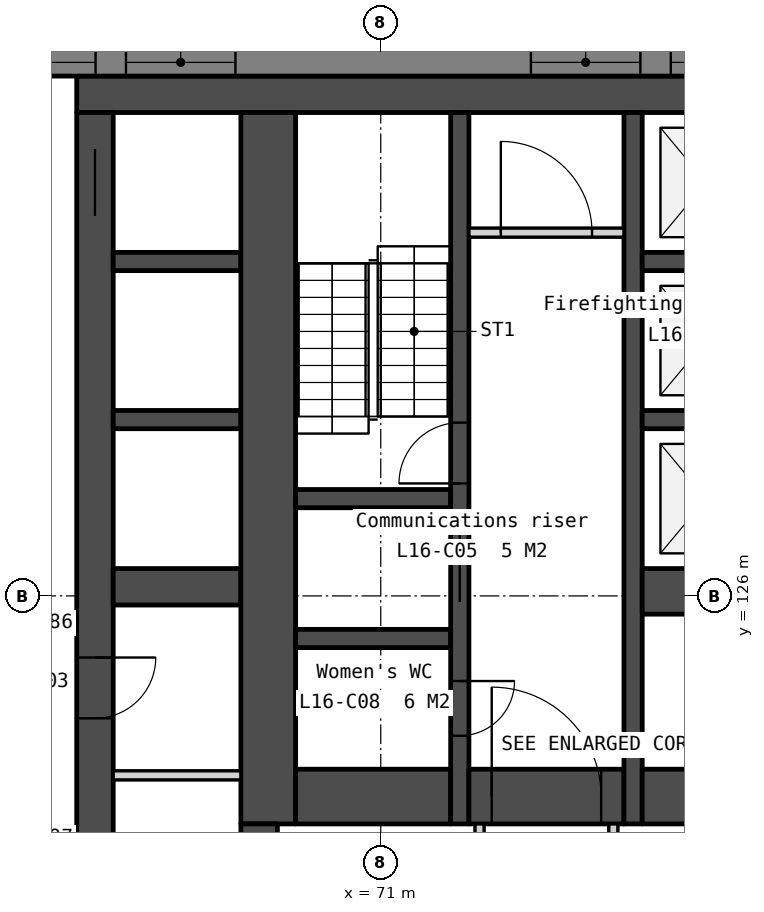
"""IFC4 building model, lengths in metres.
Left out: names, types, materials, properties, quantities, classifications, styles, units other than length and angle.
Written with IfcOpenShell. Run it as: python <this file> out.ifc"""

import sys

from ifc_helpers import new_model, si_unit, direction, frame, frame_2d, origin, place, context, subcontext, project, spatial, polyline, rectangle, outline, extrude, element, fill, save


model = new_model("IFC4")
c1 = context("Model", 3, precision=1e-05, world=origin(), true_north=direction((0.0, 1.0)))
c2 = subcontext(c1, "Body", "Model", "MODEL_VIEW")
j1 = project(units=[si_unit("LENGTHUNIT", "METRE"), si_unit("PLANEANGLEUNIT", "RADIAN")], contexts=[c1])
p1 = place(None, origin())
s1 = spatial("IfcSite", under=j1, at=p1, CompositionType="ELEMENT")
p2 = place(p1, origin())
s2 = spatial("IfcBuilding", under=s1, at=p2, CompositionType="ELEMENT")
p3 = place(p2, frame((0.0, 0.0, 70.0)))
s3 = spatial("IfcBuildingStorey", under=s2, at=p3, CompositionType="ELEMENT", Elevation=70.0)
p4 = place(p3, frame((66.0, 134.25, 0.0), z_axis=(0.0, 0.0, 1.0), x_axis=(1.0, 0.0, 0.0)))
e1 = element("IfcWall", 1, at=p4, inside=s3, PredefinedType="SOLIDWALL", context=c2, shape_type="SweptSolid", body=[
    extrude(rectangle(XDim=28.0, YDim=0.6, at=frame_2d((14.0, 0.0))), origin(), (0.0, 0.0, 1.0), 3.35),
])
p5 = place(p3, frame((66.3, 133.95, 0.0), z_axis=(0.0, 0.0, 1.0), x_axis=(0.0, -1.0, 0.0)))
e2 = element("IfcWall", 2, at=p5, inside=s3, PredefinedType="SOLIDWALL", context=c2, shape_type="SweptSolid", body=[
    extrude(rectangle(XDim=13.8, YDim=0.6, at=frame_2d((6.9, 0.0))), origin(), (0.0, 0.0, 1.0), 3.35),
])
p6 = place(p5, frame((0.6, 0.0, 0.0)))
e3 = element("IfcOpeningElement", 3, at=p6, cuts=e2, PredefinedType="OPENING", context=c2, shape_type="SweptSolid", body=[
    extrude(rectangle(XDim=1.1, YDim=2.1, at=frame_2d((0.55, 1.05))), frame((0.0, 0.31, 0.0), z_axis=(0.0, -1.0, 0.0), x_axis=(1.0, 0.0, 0.0)), (0.0, 0.0, 1.0), 0.62),
])
p7 = place(p5, frame((8.963, 0.0, 0.0)))
e4 = element("IfcOpeningElement", 4, at=p7, cuts=e2, PredefinedType="OPENING", context=c2, shape_type="SweptSolid", body=[
    extrude(rectangle(XDim=1.0, YDim=2.1, at=frame_2d((0.5, 1.05))), frame((0.0, 0.31, 0.0), z_axis=(0.0, -1.0, 0.0), x_axis=(1.0, 0.0, 0.0)), (0.0, 0.0, 1.0), 0.62),
])
p8 = place(p5, frame((11.888, 0.0, 0.0)))
e5 = element("IfcOpeningElement", 5, at=p8, cuts=e2, PredefinedType="OPENING", context=c2, shape_type="SweptSolid", body=[
    extrude(rectangle(XDim=1.0, YDim=2.1, at=frame_2d((0.5, 1.05))), frame((0.0, 0.31, 0.0), z_axis=(0.0, -1.0, 0.0), x_axis=(1.0, 0.0, 0.0)), (0.0, 0.0, 1.0), 0.62),
])
for number, where, z_axis, x_axis in (
    (6, (66.6, 131.5, 0.0), (0.0, 0.0, 1.0), (1.0, 0.0, 0.0)),
    (7, (66.6, 128.9, 0.0), (0.0, 0.0, 1.0), (1.0, 0.0, 0.0)),
):
    element("IfcWall", number, at=place(p3, frame(where, z_axis=z_axis, x_axis=x_axis)), inside=s3, PredefinedType="SOLIDWALL", context=c2, shape_type="SweptSolid", body=[
        extrude(rectangle(XDim=2.1, YDim=0.3, at=frame_2d((1.05, 0.0))), origin(), (0.0, 0.0, 1.0), 3.35),
    ])
p9 = place(p3, frame((66.6, 126.15, 0.0), z_axis=(0.0, 0.0, 1.0), x_axis=(1.0, 0.0, 0.0)))
e8 = element("IfcWall", 8, at=p9, inside=s3, PredefinedType="SOLIDWALL", context=c2, shape_type="SweptSolid", body=[
    extrude(rectangle(XDim=2.1, YDim=0.6, at=frame_2d((1.05, 0.0))), origin(), (0.0, 0.0, 1.0), 3.35),
])
p10 = place(p3, frame((66.6, 123.049, 0.0), z_axis=(0.0, 0.0, 1.0), x_axis=(1.0, 0.0, 0.0)))
e9 = element("IfcWall", 9, at=p10, inside=s3, PredefinedType="PARTITIONING", context=c2, shape_type="SweptSolid", body=[
    extrude(rectangle(XDim=2.1, YDim=0.15, at=frame_2d((1.05, 0.0))), origin(), (0.0, 0.0, 1.0), 3.35),
])
p11 = place(p3, frame((69.15, 133.95, 0.0), z_axis=(0.0, 0.0, 1.0), x_axis=(0.0, -1.0, 0.0)))
e10 = element("IfcWall", 10, at=p11, inside=s3, PredefinedType="SOLIDWALL", context=c2, shape_type="SweptSolid", body=[
    extrude(rectangle(XDim=11.7, YDim=0.9, at=frame_2d((5.85, 0.0))), origin(), (0.0, 0.0, 1.0), 3.35),
])
p12 = place(p3, frame((69.0, 122.25, 0.0), z_axis=(0.0, 0.0, 1.0), x_axis=(0.0, -1.0, 0.0)))
e11 = element("IfcWall", 11, at=p12, inside=s3, PredefinedType="SOLIDWALL", context=c2, shape_type="SweptSolid", body=[
    extrude(rectangle(XDim=2.1, YDim=0.6, at=frame_2d((1.05, 0.0))), origin(), (0.0, 0.0, 1.0), 3.35),
])
for number, where, z_axis, x_axis in (
    (12, (69.6, 127.6, 0.0), (0.0, 0.0, 1.0), (1.0, 0.0, 0.0)),
    (13, (69.6, 125.3, 0.0), (0.0, 0.0, 1.0), (1.0, 0.0, 0.0)),
):
    element("IfcWall", number, at=place(p3, frame(where, z_axis=z_axis, x_axis=x_axis)), inside=s3, PredefinedType="SOLIDWALL", context=c2, shape_type="SweptSolid", body=[
        extrude(rectangle(XDim=2.55, YDim=0.3, at=frame_2d((1.275, 0.0))), origin(), (0.0, 0.0, 1.0), 3.35),
    ])
p13 = place(p3, frame((69.6, 122.7, 0.0), z_axis=(0.0, 0.0, 1.0), x_axis=(1.0, 0.0, 0.0)))
e14 = element("IfcWall", 14, at=p13, inside=s3, PredefinedType="SOLIDWALL", context=c2, shape_type="SweptSolid", body=[
    extrude(rectangle(XDim=2.55, YDim=0.9, at=frame_2d((1.275, 0.0))), origin(), (0.0, 0.0, 1.0), 3.35),
])
p14 = place(p3, frame((72.3, 133.95, 0.0), z_axis=(0.0, 0.0, 1.0), x_axis=(0.0, -1.0, 0.0)))
e15 = element("IfcWall", 15, at=p14, inside=s3, PredefinedType="SOLIDWALL", context=c2, shape_type="SweptSolid", body=[
    extrude(rectangle(XDim=11.7, YDim=0.3, at=frame_2d((5.85, 0.0))), origin(), (0.0, 0.0, 1.0), 3.35),
])
p15 = place(p14, frame((6.95, 0.0, 0.0)))
e16 = element("IfcOpeningElement", 16, at=p15, cuts=e15, PredefinedType="OPENING", context=c2, shape_type="SweptSolid", body=[
    extrude(rectangle(XDim=1.1, YDim=2.1, at=frame_2d((0.55, 1.05))), frame((0.0, 0.16, 0.0), z_axis=(0.0, -1.0, 0.0), x_axis=(1.0, 0.0, 0.0)), (0.0, 0.0, 1.0), 0.32),
])
p16 = place(p14, frame((9.35, 0.0, 0.0)))
e17 = element("IfcOpeningElement", 17, at=p16, cuts=e15, PredefinedType="OPENING", context=c2, shape_type="SweptSolid", body=[
    extrude(rectangle(XDim=0.9, YDim=2.1, at=frame_2d((0.45, 1.05))), frame((0.0, 0.16, 0.0), z_axis=(0.0, -1.0, 0.0), x_axis=(1.0, 0.0, 0.0)), (0.0, 0.0, 1.0), 0.32),
])
p17 = place(p14, frame((5.1, 0.0, 0.0)))
e18 = element("IfcOpeningElement", 18, at=p17, cuts=e15, PredefinedType="OPENING", context=c2, shape_type="SweptSolid", body=[
    extrude(rectangle(XDim=1.0, YDim=2.1, at=frame_2d((0.5, 1.05))), frame((0.0, 0.16, 0.0), z_axis=(0.0, -1.0, 0.0), x_axis=(1.0, 0.0, 0.0)), (0.0, 0.0, 1.0), 0.32),
])
p18 = place(p3, frame((72.45, 131.975, 0.0), z_axis=(0.0, 0.0, 1.0), x_axis=(1.0, 0.0, 0.0)))
e19 = element("IfcWall", 19, at=p18, inside=s3, PredefinedType="PARTITIONING", context=c2, shape_type="SweptSolid", body=[
    extrude(rectangle(XDim=2.55, YDim=0.15, at=frame_2d((1.275, 0.0))), origin(), (0.0, 0.0, 1.0), 3.35),
])
p19 = place(p18, frame((0.525, 0.0, 0.0)))
e20 = element("IfcOpeningElement", 20, at=p19, cuts=e19, PredefinedType="OPENING", context=c2, shape_type="SweptSolid", body=[
    extrude(rectangle(XDim=1.5, YDim=2.1, at=frame_2d((0.75, 1.05))), frame((0.0, 0.085, 0.0), z_axis=(0.0, -1.0, 0.0), x_axis=(1.0, 0.0, 0.0)), (0.0, 0.0, 1.0), 0.17),
])
p20 = place(p3, frame((72.45, 122.7, 0.0), z_axis=(0.0, 0.0, 1.0), x_axis=(1.0, 0.0, 0.0)))
e21 = element("IfcWall", 21, at=p20, inside=s3, PredefinedType="SOLIDWALL", context=c2, shape_type="SweptSolid", body=[
    extrude(rectangle(XDim=2.55, YDim=0.9, at=frame_2d((1.275, 0.0))), origin(), (0.0, 0.0, 1.0), 3.35),
])
p21 = place(p20, frame((0.375, 0.0, 0.0)))
e22 = element("IfcOpeningElement", 22, at=p21, cuts=e21, PredefinedType="OPENING", context=c2, shape_type="SweptSolid", body=[
    extrude(rectangle(XDim=1.8, YDim=2.1, at=frame_2d((0.9, 1.05))), frame((0.0, 0.46, 0.0), z_axis=(0.0, -1.0, 0.0), x_axis=(1.0, 0.0, 0.0)), (0.0, 0.0, 1.0), 0.92),
])
for number, where, z_axis, x_axis in (
    (23, (72.625, 122.25, 0.0), (0.0, 0.0, 1.0), (0.0, -1.0, 0.0)),
    (24, (74.825, 122.25, 0.0), (0.0, 0.0, 1.0), (0.0, -1.0, 0.0)),
):
    element("IfcWall", number, at=place(p3, frame(where, z_axis=z_axis, x_axis=x_axis)), inside=s3, PredefinedType="PARTITIONING", context=c2, shape_type="SweptSolid", body=[
        extrude(rectangle(XDim=2.1, YDim=0.15, at=frame_2d((1.05, 0.0))), origin(), (0.0, 0.0, 1.0), 3.35),
    ])
p22 = place(p3, frame((75.15, 133.95, 0.0), z_axis=(0.0, 0.0, 1.0), x_axis=(0.0, -1.0, 0.0)))
e25 = element("IfcWall", 25, at=p22, inside=s3, PredefinedType="SOLIDWALL", context=c2, shape_type="SweptSolid", body=[
    extrude(rectangle(XDim=11.7, YDim=0.3, at=frame_2d((5.85, 0.0))), origin(), (0.0, 0.0, 1.0), 3.35),
])
for number, where, z_axis, x_axis in (
    (26, (75.3, 131.5, 0.0), (0.0, 0.0, 1.0), (1.0, 0.0, 0.0)),
    (27, (75.3, 128.9, 0.0), (0.0, 0.0, 1.0), (1.0, 0.0, 0.0)),
):
    element("IfcWall", number, at=place(p3, frame(where, z_axis=z_axis, x_axis=x_axis)), inside=s3, PredefinedType="SOLIDWALL", context=c2, shape_type="SweptSolid", body=[
        extrude(rectangle(XDim=2.1, YDim=0.3, at=frame_2d((1.05, 0.0))), origin(), (0.0, 0.0, 1.0), 3.35),
    ])
p23 = place(p3, frame((75.3, 126.075, 0.0), z_axis=(0.0, 0.0, 1.0), x_axis=(1.0, 0.0, 0.0)))
e28 = element("IfcWall", 28, at=p23, inside=s3, PredefinedType="SOLIDWALL", context=c2, shape_type="SweptSolid", body=[
    extrude(rectangle(XDim=2.1, YDim=0.75, at=frame_2d((1.05, 0.0))), origin(), (0.0, 0.0, 1.0), 3.35),
])
p24 = place(p3, frame((75.3, 122.7, 0.0), z_axis=(0.0, 0.0, 1.0), x_axis=(1.0, 0.0, 0.0)))
e29 = element("IfcWall", 29, at=p24, inside=s3, PredefinedType="SOLIDWALL", context=c2, shape_type="SweptSolid", body=[
    extrude(rectangle(XDim=6.2, YDim=0.9, at=frame_2d((3.1, 0.0))), origin(), (0.0, 0.0, 1.0), 3.35),
])
p25 = place(p3, frame((102.4, 134.775, -0.15), z_axis=(0.0, 0.0, 1.0), x_axis=(-1.0, 0.0, 0.0)))
e30 = element("IfcWall", 30, at=p25, inside=s3, PredefinedType="SOLIDWALL", context=c2, shape_type="SweptSolid", body=[
    extrude(outline(polyline([(44.8, 0.0), (44.8, 3.5), (0.0, 3.5), (0.0, 0.0), (44.8, 0.0)])), frame((0.0, 0.225, 0.0), z_axis=(0.0, -1.0, 0.0), x_axis=(1.0, 0.0, 0.0)), (0.0, 0.0, 1.0), 0.45),
])
p26 = place(p25, frame((0.786, 0.0, 1.05)))
e31 = element("IfcOpeningElement", 31, at=p26, cuts=e30, PredefinedType="OPENING", context=c2, shape_type="SweptSolid", body=[
    extrude(rectangle(XDim=1.2, YDim=1.5, at=frame_2d((0.6, 0.75))), frame((0.0, 0.235, 0.0), z_axis=(0.0, -1.0, 0.0), x_axis=(1.0, 0.0, 0.0)), (0.0, 0.0, 1.0), 0.47),
])
p27 = place(p25, frame((6.91, 0.0, 1.05)))
e32 = element("IfcOpeningElement", 32, at=p27, cuts=e30, PredefinedType="OPENING", context=c2, shape_type="SweptSolid", body=[
    extrude(rectangle(XDim=1.8, YDim=1.5, at=frame_2d((0.9, 0.75))), frame((0.0, 0.235, 0.0), z_axis=(0.0, -1.0, 0.0), x_axis=(1.0, 0.0, 0.0)), (0.0, 0.0, 1.0), 0.47),
])
p28 = place(p25, frame((9.21, 0.0, 1.05)))
e33 = element("IfcOpeningElement", 33, at=p28, cuts=e30, PredefinedType="OPENING", context=c2, shape_type="SweptSolid", body=[
    extrude(rectangle(XDim=1.8, YDim=1.5, at=frame_2d((0.9, 0.75))), frame((0.0, 0.235, 0.0), z_axis=(0.0, -1.0, 0.0), x_axis=(1.0, 0.0, 0.0)), (0.0, 0.0, 1.0), 0.47),
])
p29 = place(p25, frame((15.87, 0.0, 1.05)))
e34 = element("IfcOpeningElement", 34, at=p29, cuts=e30, PredefinedType="OPENING", context=c2, shape_type="SweptSolid", body=[
    extrude(rectangle(XDim=1.8, YDim=1.5, at=frame_2d((0.9, 0.75))), frame((0.0, 0.235, 0.0), z_axis=(0.0, -1.0, 0.0), x_axis=(1.0, 0.0, 0.0)), (0.0, 0.0, 1.0), 0.47),
])
p30 = place(p25, frame((18.17, 0.0, 1.05)))
e35 = element("IfcOpeningElement", 35, at=p30, cuts=e30, PredefinedType="OPENING", context=c2, shape_type="SweptSolid", body=[
    extrude(rectangle(XDim=1.8, YDim=1.5, at=frame_2d((0.9, 0.75))), frame((0.0, 0.235, 0.0), z_axis=(0.0, -1.0, 0.0), x_axis=(1.0, 0.0, 0.0)), (0.0, 0.0, 1.0), 0.47),
])
p31 = place(p25, frame((24.83, 0.0, 1.05)))
e36 = element("IfcOpeningElement", 36, at=p31, cuts=e30, PredefinedType="OPENING", context=c2, shape_type="SweptSolid", body=[
    extrude(rectangle(XDim=1.8, YDim=1.5, at=frame_2d((0.9, 0.75))), frame((0.0, 0.235, 0.0), z_axis=(0.0, -1.0, 0.0), x_axis=(1.0, 0.0, 0.0)), (0.0, 0.0, 1.0), 0.47),
])
p32 = place(p25, frame((27.13, 0.0, 1.05)))
e37 = element("IfcOpeningElement", 37, at=p32, cuts=e30, PredefinedType="OPENING", context=c2, shape_type="SweptSolid", body=[
    extrude(rectangle(XDim=1.8, YDim=1.5, at=frame_2d((0.9, 0.75))), frame((0.0, 0.235, 0.0), z_axis=(0.0, -1.0, 0.0), x_axis=(1.0, 0.0, 0.0)), (0.0, 0.0, 1.0), 0.47),
])
p33 = place(p25, frame((33.79, 0.0, 1.05)))
e38 = element("IfcOpeningElement", 38, at=p33, cuts=e30, PredefinedType="OPENING", context=c2, shape_type="SweptSolid", body=[
    extrude(rectangle(XDim=1.8, YDim=1.5, at=frame_2d((0.9, 0.75))), frame((0.0, 0.235, 0.0), z_axis=(0.0, -1.0, 0.0), x_axis=(1.0, 0.0, 0.0)), (0.0, 0.0, 1.0), 0.47),
])
p34 = place(p25, frame((36.09, 0.0, 1.05)))
e39 = element("IfcOpeningElement", 39, at=p34, cuts=e30, PredefinedType="OPENING", context=c2, shape_type="SweptSolid", body=[
    extrude(rectangle(XDim=1.8, YDim=1.5, at=frame_2d((0.9, 0.75))), frame((0.0, 0.235, 0.0), z_axis=(0.0, -1.0, 0.0), x_axis=(1.0, 0.0, 0.0)), (0.0, 0.0, 1.0), 0.47),
])
p35 = place(p25, frame((42.814, 0.0, 1.05)))
e40 = element("IfcOpeningElement", 40, at=p35, cuts=e30, PredefinedType="OPENING", context=c2, shape_type="SweptSolid", body=[
    extrude(rectangle(XDim=1.2, YDim=1.5, at=frame_2d((0.6, 0.75))), frame((0.0, 0.235, 0.0), z_axis=(0.0, -1.0, 0.0), x_axis=(1.0, 0.0, 0.0)), (0.0, 0.0, 1.0), 0.47),
])
p36 = place(p3, frame((54.495, 129.397, -0.15), z_axis=(0.0, 0.0, 1.0), x_axis=(0.499999201451, -0.866025864826, 0.0)))
e41 = element("IfcWall", 41, at=p36, inside=s3, PredefinedType="SOLIDWALL", context=c2, shape_type="SweptSolid", body=[
    extrude(outline(polyline([(44.8, 0.0), (44.8, 3.5), (0.0, 3.5), (0.0, 0.0), (44.8, 0.0)])), frame((0.0, 0.225, 0.0), z_axis=(0.0, -1.0, 0.0), x_axis=(1.0, 0.0, 0.0)), (0.0, 0.0, 1.0), 0.45),
])
p37 = place(p36, frame((0.786, 0.0, 1.05)))
e42 = element("IfcOpeningElement", 42, at=p37, cuts=e41, PredefinedType="OPENING", context=c2, shape_type="SweptSolid", body=[
    extrude(rectangle(XDim=1.2, YDim=1.5, at=frame_2d((0.6, 0.75))), frame((0.0, 0.235, 0.0), z_axis=(0.0, -1.0, 0.0), x_axis=(1.0, 0.0, 0.0)), (0.0, 0.0, 1.0), 0.47),
])
p38 = place(p36, frame((6.91, 0.0, 1.05)))
e43 = element("IfcOpeningElement", 43, at=p38, cuts=e41, PredefinedType="OPENING", context=c2, shape_type="SweptSolid", body=[
    extrude(rectangle(XDim=1.8, YDim=1.5, at=frame_2d((0.9, 0.75))), frame((0.0, 0.235, 0.0), z_axis=(0.0, -1.0, 0.0), x_axis=(1.0, 0.0, 0.0)), (0.0, 0.0, 1.0), 0.47),
])
p39 = place(p36, frame((9.21, 0.0, 1.05)))
e44 = element("IfcOpeningElement", 44, at=p39, cuts=e41, PredefinedType="OPENING", context=c2, shape_type="SweptSolid", body=[
    extrude(rectangle(XDim=1.8, YDim=1.5, at=frame_2d((0.9, 0.75))), frame((0.0, 0.235, 0.0), z_axis=(0.0, -1.0, 0.0), x_axis=(1.0, 0.0, 0.0)), (0.0, 0.0, 1.0), 0.47),
])
p40 = place(p36, frame((15.87, 0.0, 1.05)))
e45 = element("IfcOpeningElement", 45, at=p40, cuts=e41, PredefinedType="OPENING", context=c2, shape_type="SweptSolid", body=[
    extrude(rectangle(XDim=1.8, YDim=1.5, at=frame_2d((0.9, 0.75))), frame((0.0, 0.235, 0.0), z_axis=(0.0, -1.0, 0.0), x_axis=(1.0, 0.0, 0.0)), (0.0, 0.0, 1.0), 0.47),
])
p41 = place(p36, frame((18.17, 0.0, 1.05)))
e46 = element("IfcOpeningElement", 46, at=p41, cuts=e41, PredefinedType="OPENING", context=c2, shape_type="SweptSolid", body=[
    extrude(rectangle(XDim=1.8, YDim=1.5, at=frame_2d((0.9, 0.75))), frame((0.0, 0.235, 0.0), z_axis=(0.0, -1.0, 0.0), x_axis=(1.0, 0.0, 0.0)), (0.0, 0.0, 1.0), 0.47),
])
p42 = place(p36, frame((24.83, 0.0, 1.05)))
e47 = element("IfcOpeningElement", 47, at=p42, cuts=e41, PredefinedType="OPENING", context=c2, shape_type="SweptSolid", body=[
    extrude(rectangle(XDim=1.8, YDim=1.5, at=frame_2d((0.9, 0.75))), frame((0.0, 0.235, 0.0), z_axis=(0.0, -1.0, 0.0), x_axis=(1.0, 0.0, 0.0)), (0.0, 0.0, 1.0), 0.47),
])
p43 = place(p36, frame((27.13, 0.0, 1.05)))
e48 = element("IfcOpeningElement", 48, at=p43, cuts=e41, PredefinedType="OPENING", context=c2, shape_type="SweptSolid", body=[
    extrude(rectangle(XDim=1.8, YDim=1.5, at=frame_2d((0.9, 0.75))), frame((0.0, 0.235, 0.0), z_axis=(0.0, -1.0, 0.0), x_axis=(1.0, 0.0, 0.0)), (0.0, 0.0, 1.0), 0.47),
])
p44 = place(p36, frame((33.79, 0.0, 1.05)))
e49 = element("IfcOpeningElement", 49, at=p44, cuts=e41, PredefinedType="OPENING", context=c2, shape_type="SweptSolid", body=[
    extrude(rectangle(XDim=1.8, YDim=1.5, at=frame_2d((0.9, 0.75))), frame((0.0, 0.235, 0.0), z_axis=(0.0, -1.0, 0.0), x_axis=(1.0, 0.0, 0.0)), (0.0, 0.0, 1.0), 0.47),
])
p45 = place(p36, frame((36.09, 0.0, 1.05)))
e50 = element("IfcOpeningElement", 50, at=p45, cuts=e41, PredefinedType="OPENING", context=c2, shape_type="SweptSolid", body=[
    extrude(rectangle(XDim=1.8, YDim=1.5, at=frame_2d((0.9, 0.75))), frame((0.0, 0.235, 0.0), z_axis=(0.0, -1.0, 0.0), x_axis=(1.0, 0.0, 0.0)), (0.0, 0.0, 1.0), 0.47),
])
p46 = place(p36, frame((42.814, 0.0, 1.05)))
e51 = element("IfcOpeningElement", 51, at=p46, cuts=e41, PredefinedType="OPENING", context=c2, shape_type="SweptSolid", body=[
    extrude(rectangle(XDim=1.2, YDim=1.5, at=frame_2d((0.6, 0.75))), frame((0.0, 0.235, 0.0), z_axis=(0.0, -1.0, 0.0), x_axis=(1.0, 0.0, 0.0)), (0.0, 0.0, 1.0), 0.47),
])
p47 = place(p6, origin())
e52 = element("IfcDoor", 52, at=p47, inside=s3, OperationType="SLIDING_TO_LEFT", PredefinedType="DOOR", context=c2, shape_type="SweptSolid", body=[
    extrude(rectangle(XDim=1.1, YDim=2.1, at=frame_2d((0.55, 1.05))), frame((0.0, 0.025, 0.0), z_axis=(0.0, -1.0, 0.0), x_axis=(1.0, 0.0, 0.0)), (0.0, 0.0, 1.0), 0.05),
])
fill(e3, e52)
p48 = place(p15, origin())
e53 = element("IfcDoor", 53, at=p48, inside=s3, OperationType="SLIDING_TO_LEFT", PredefinedType="DOOR", context=c2, shape_type="SweptSolid", body=[
    extrude(rectangle(XDim=1.1, YDim=2.1, at=frame_2d((0.55, 1.05))), frame((0.0, 0.025, 0.0), z_axis=(0.0, -1.0, 0.0), x_axis=(1.0, 0.0, 0.0)), (0.0, 0.0, 1.0), 0.05),
])
fill(e16, e53)
p49 = place(p21, origin())
e54 = element("IfcDoor", 54, at=p49, inside=s3, OperationType="DOUBLE_DOOR_DOUBLE_SWING", PredefinedType="DOOR", context=c2, shape_type="SweptSolid", body=[
    extrude(rectangle(XDim=1.8, YDim=2.1, at=frame_2d((0.9, 1.05))), frame((0.0, 0.025, 0.0), z_axis=(0.0, -1.0, 0.0), x_axis=(1.0, 0.0, 0.0)), (0.0, 0.0, 1.0), 0.05),
])
fill(e22, e54)
p50 = place(p19, origin())
e55 = element("IfcDoor", 55, at=p50, inside=s3, OperationType="DOUBLE_DOOR_DOUBLE_SWING", PredefinedType="DOOR", context=c2, shape_type="SweptSolid", body=[
    extrude(rectangle(XDim=1.5, YDim=2.1, at=frame_2d((0.75, 1.05))), frame((0.0, 0.025, 0.0), z_axis=(0.0, -1.0, 0.0), x_axis=(1.0, 0.0, 0.0)), (0.0, 0.0, 1.0), 0.05),
])
fill(e20, e55)
p51 = place(p16, origin())
e56 = element("IfcDoor", 56, at=p51, inside=s3, OperationType="SINGLE_SWING_LEFT", PredefinedType="DOOR", context=c2, shape_type="SweptSolid", body=[
    extrude(rectangle(XDim=0.9, YDim=2.1, at=frame_2d((0.45, 1.05))), frame((0.0, 0.025, 0.0), z_axis=(0.0, -1.0, 0.0), x_axis=(1.0, 0.0, 0.0)), (0.0, 0.0, 1.0), 0.05),
])
fill(e17, e56)
p52 = place(p17, origin())
e57 = element("IfcDoor", 57, at=p52, inside=s3, OperationType="SINGLE_SWING_RIGHT", PredefinedType="DOOR", context=c2, shape_type="SweptSolid", body=[
    extrude(rectangle(XDim=1.0, YDim=2.1, at=frame_2d((0.5, 1.05))), frame((0.0, 0.025, 0.0), z_axis=(0.0, -1.0, 0.0), x_axis=(1.0, 0.0, 0.0)), (0.0, 0.0, 1.0), 0.05),
])
fill(e18, e57)
p53 = place(p7, origin())
e58 = element("IfcDoor", 58, at=p53, inside=s3, OperationType="SINGLE_SWING_LEFT", PredefinedType="DOOR", context=c2, shape_type="SweptSolid", body=[
    extrude(rectangle(XDim=1.0, YDim=2.1, at=frame_2d((0.5, 1.05))), frame((0.0, 0.025, 0.0), z_axis=(0.0, -1.0, 0.0), x_axis=(1.0, 0.0, 0.0)), (0.0, 0.0, 1.0), 0.05),
])
fill(e4, e58)
p54 = place(p31, origin())
e59 = element("IfcWindow", 59, at=p54, inside=s3, PartitioningType="SINGLE_PANEL", PredefinedType="WINDOW", context=c2, shape_type="SweptSolid", body=[
    extrude(rectangle(XDim=1.8, YDim=1.5, at=frame_2d((0.9, 0.75))), frame((0.0, 0.03, 0.0), z_axis=(0.0, -1.0, 0.0), x_axis=(1.0, 0.0, 0.0)), (0.0, 0.0, 1.0), 0.06),
])
fill(e36, e59)
p55 = place(p32, origin())
e60 = element("IfcWindow", 60, at=p55, inside=s3, PartitioningType="SINGLE_PANEL", PredefinedType="WINDOW", context=c2, shape_type="SweptSolid", body=[
    extrude(rectangle(XDim=1.8, YDim=1.5, at=frame_2d((0.9, 0.75))), frame((0.0, 0.03, 0.0), z_axis=(0.0, -1.0, 0.0), x_axis=(1.0, 0.0, 0.0)), (0.0, 0.0, 1.0), 0.06),
])
fill(e37, e60)
p56 = place(p33, origin())
e61 = element("IfcWindow", 61, at=p56, inside=s3, PartitioningType="SINGLE_PANEL", PredefinedType="WINDOW", context=c2, shape_type="SweptSolid", body=[
    extrude(rectangle(XDim=1.8, YDim=1.5, at=frame_2d((0.9, 0.75))), frame((0.0, 0.03, 0.0), z_axis=(0.0, -1.0, 0.0), x_axis=(1.0, 0.0, 0.0)), (0.0, 0.0, 1.0), 0.06),
])
fill(e38, e61)
p57 = place(p34, origin())
e62 = element("IfcWindow", 62, at=p57, inside=s3, PartitioningType="SINGLE_PANEL", PredefinedType="WINDOW", context=c2, shape_type="SweptSolid", body=[
    extrude(rectangle(XDim=1.8, YDim=1.5, at=frame_2d((0.9, 0.75))), frame((0.0, 0.03, 0.0), z_axis=(0.0, -1.0, 0.0), x_axis=(1.0, 0.0, 0.0)), (0.0, 0.0, 1.0), 0.06),
])
fill(e39, e62)
save(model, sys.argv[1])
